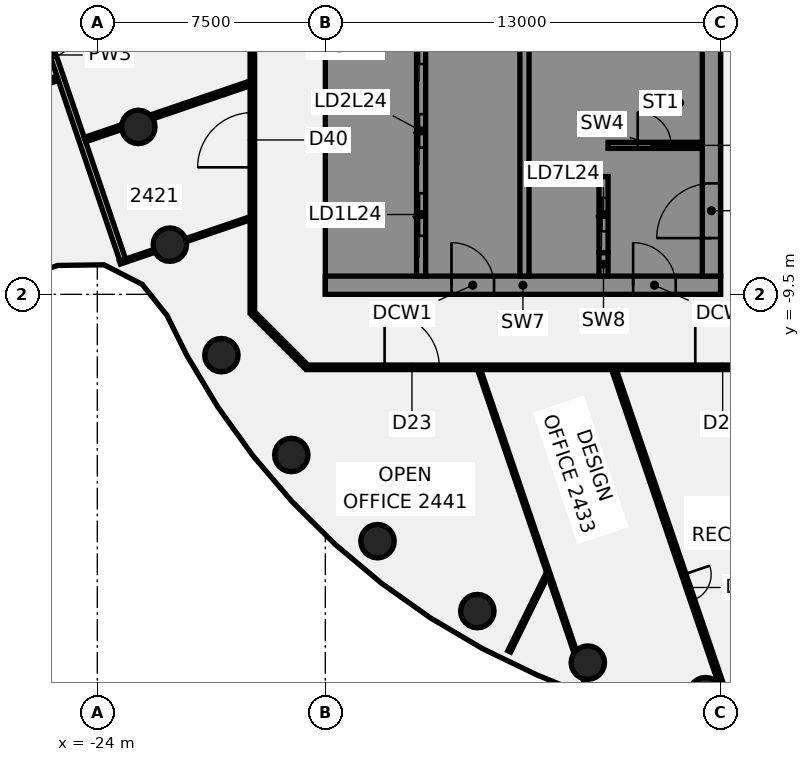
"""IFC4 building model, lengths in metres.
Left out: names, types, materials, properties, quantities, classifications, styles, units other than length and angle.
Written with IfcOpenShell. Run it as: python <this file> out.ifc"""

import sys

from ifc_helpers import new_model, si_unit, direction, frame, frame_2d, origin, origin_2d, place, context, subcontext, project, spatial, polyline, rectangle, circle, outline, extrude, element, fill, save


model = new_model("IFC4")
c1 = context("Model", 3, precision=1e-05, world=origin(), true_north=direction((0.0, 1.0)))
c2 = subcontext(c1, "Body", "Model", "MODEL_VIEW")
j1 = project(units=[si_unit("LENGTHUNIT", "METRE"), si_unit("PLANEANGLEUNIT", "RADIAN")], contexts=[c1])
p1 = place(None, origin())
s1 = spatial("IfcSite", under=j1, at=p1, CompositionType="ELEMENT")
p2 = place(p1, origin())
s2 = spatial("IfcBuilding", under=s1, at=p2, CompositionType="ELEMENT")
p3 = place(p2, frame((0.0, 0.0, 102.25)))
s3 = spatial("IfcBuildingStorey", under=s2, at=p3, CompositionType="ELEMENT", Elevation=102.25)
for number, where, z_axis, x_axis in (
    (1, (-22.651, -3.994, -0.14), (0.0, 0.0, 1.0), (1.0, 0.0, 0.0)),
    (2, (-21.613, -7.866, -0.14), (0.0, 0.0, 1.0), (1.0, 0.0, 0.0)),
    (3, (-19.919, -11.5, -0.14), (0.0, 0.0, 1.0), (1.0, 0.0, 0.0)),
    (4, (-17.619, -14.784, -0.14), (0.0, 0.0, 1.0), (1.0, 0.0, 0.0)),
    (5, (-14.784, -17.619, -0.14), (0.0, 0.0, 1.0), (1.0, 0.0, 0.0)),
    (6, (-11.5, -19.919, -0.14), (0.0, 0.0, 1.0), (1.0, 0.0, 0.0)),
    (7, (-7.866, -21.613, -0.14), (0.0, 0.0, 1.0), (1.0, 0.0, 0.0)),
    (8, (-3.994, -22.651, -0.14), (0.0, 0.0, 1.0), (1.0, 0.0, 0.0)),
):
    element("IfcColumn", number, at=place(p3, frame(where, z_axis=z_axis, x_axis=x_axis)), inside=s3, PredefinedType="COLUMN", context=c2, shape_type="SweptSolid", body=[
        extrude(circle(Radius=0.55, at=origin_2d()), origin(), (0.0, 0.0, 1.0), 3.75),
    ])
p4 = place(p3, frame((-27.757, 5.116, 0.0), z_axis=(0.0, 0.0, 1.0), x_axis=(0.32239970141, -0.946603630107, 0.0)))
e9 = element("IfcWall", 9, at=p4, inside=s3, PredefinedType="PARTITIONING", context=c2, shape_type="SweptSolid", body=[
    extrude(rectangle(XDim=14.249, YDim=0.2, at=frame_2d((7.124, 0.0))), origin(), (0.0, 0.0, 1.0), 3.01),
])
p5 = place(p4, frame((5.799, 0.0, 0.0)))
e10 = element("IfcOpeningElement", 10, at=p5, cuts=e9, PredefinedType="OPENING", context=c2, shape_type="SweptSolid", body=[
    extrude(rectangle(XDim=1.4, YDim=2.1, at=frame_2d((0.7, 1.05))), frame((0.0, 0.11, 0.0), z_axis=(0.0, -1.0, 0.0), x_axis=(1.0, 0.0, 0.0)), (0.0, 0.0, 1.0), 0.22),
])
p6 = place(p3, frame((-11.442, -11.976, 0.0), z_axis=(0.0, 0.0, 1.0), x_axis=(0.322410906035, -0.946599813897, 0.0)))
e11 = element("IfcWall", 11, at=p6, inside=s3, PredefinedType="PARTITIONING", context=c2, shape_type="SweptSolid", body=[
    extrude(rectangle(XDim=9.809, YDim=0.1, at=frame_2d((4.905, 0.0))), origin(), (0.0, 0.0, 1.0), 3.01),
])
p7 = place(p3, frame((-7.979, -22.143, 0.0), z_axis=(0.0, 0.0, 1.0), x_axis=(0.322833185495, -0.946455880822, 0.0)))
e12 = element("IfcWall", 12, at=p7, inside=s3, PredefinedType="PARTITIONING", context=c2, shape_type="SweptSolid", body=[
    extrude(rectangle(XDim=0.343, YDim=0.1, at=frame_2d((0.172, 0.0))), origin(), (0.0, 0.0, 1.0), 3.01),
])
p8 = place(p3, frame((-7.004, -11.98, 0.0), z_axis=(0.0, 0.0, 1.0), x_axis=(0.322345808009, -0.946621983718, 0.0)))
e13 = element("IfcWall", 13, at=p8, inside=s3, PredefinedType="PARTITIONING", context=c2, shape_type="SweptSolid", body=[
    extrude(rectangle(XDim=11.863, YDim=0.15, at=frame_2d((5.932, 0.0))), origin(), (0.0, 0.0, 1.0), 3.01),
])
p9 = place(p8, frame((7.115, 0.0, 0.0)))
e14 = element("IfcOpeningElement", 14, at=p9, cuts=e13, PredefinedType="OPENING", context=c2, shape_type="SweptSolid", body=[
    extrude(rectangle(XDim=0.9, YDim=2.1, at=frame_2d((0.45, 1.05))), frame((0.0, 0.085, 0.0), z_axis=(0.0, -1.0, 0.0), x_axis=(1.0, 0.0, 0.0)), (0.0, 0.0, 1.0), 0.17),
])
p10 = place(p3, frame((-18.872, -10.128, 0.0), z_axis=(0.0, 0.0, 1.0), x_axis=(0.707106781187, -0.707106781187, 0.0)))
e15 = element("IfcWall", 15, at=p10, inside=s3, PredefinedType="PARTITIONING", context=c2, shape_type="SweptSolid", body=[
    extrude(rectangle(XDim=2.465, YDim=0.15, at=frame_2d((1.232, 0.0))), origin(), (0.0, 0.0, 1.0), 3.01),
])
p11 = place(p3, frame((-17.1, -11.9, 0.0), z_axis=(0.0, 0.0, 1.0), x_axis=(1.0, 0.0, 0.0)))
e16 = element("IfcWall", 16, at=p11, inside=s3, PredefinedType="PARTITIONING", context=c2, shape_type="SweptSolid", body=[
    extrude(rectangle(XDim=34.165, YDim=0.15, at=frame_2d((17.083, 0.0))), origin(), (0.0, 0.0, 1.0), 3.01),
])
p12 = place(p11, frame((12.769, 0.0, 0.0)))
e17 = element("IfcOpeningElement", 17, at=p12, cuts=e16, PredefinedType="OPENING", context=c2, shape_type="SweptSolid", body=[
    extrude(rectangle(XDim=1.8, YDim=2.1, at=frame_2d((0.9, 1.05))), frame((0.0, 0.085, 0.0), z_axis=(0.0, -1.0, 0.0), x_axis=(1.0, 0.0, 0.0)), (0.0, 0.0, 1.0), 0.17),
])
p13 = place(p11, frame((2.55, 0.0, 0.0)))
e18 = element("IfcOpeningElement", 18, at=p13, cuts=e16, PredefinedType="OPENING", context=c2, shape_type="SweptSolid", body=[
    extrude(rectangle(XDim=1.8, YDim=2.1, at=frame_2d((0.9, 1.05))), frame((0.0, 0.085, 0.0), z_axis=(0.0, -1.0, 0.0), x_axis=(1.0, 0.0, 0.0)), (0.0, 0.0, 1.0), 0.17),
])
p14 = place(p11, frame((26.939, 0.0, 0.0)))
e19 = element("IfcOpeningElement", 19, at=p14, cuts=e16, PredefinedType="OPENING", context=c2, shape_type="SweptSolid", body=[
    extrude(rectangle(XDim=1.8, YDim=2.1, at=frame_2d((0.9, 1.05))), frame((0.0, 0.085, 0.0), z_axis=(0.0, -1.0, 0.0), x_axis=(1.0, 0.0, 0.0)), (0.0, 0.0, 1.0), 0.17),
])
p15 = place(p3, frame((-37.914, -6.687, 0.0), z_axis=(0.0, 0.0, 1.0), x_axis=(0.946617293071, 0.322359582545, 0.0)))
e20 = element("IfcWall", 20, at=p15, inside=s3, PredefinedType="PARTITIONING", context=c2, shape_type="SweptSolid", body=[
    extrude(rectangle(XDim=13.316, YDim=0.15, at=frame_2d((6.658, 0.0))), origin(), (0.0, 0.0, 1.0), 3.01),
])
p16 = place(p15, frame((4.42, 0.0, 0.0)))
e21 = element("IfcOpeningElement", 21, at=p16, cuts=e20, PredefinedType="OPENING", context=c2, shape_type="SweptSolid", body=[
    extrude(rectangle(XDim=0.9, YDim=2.1, at=frame_2d((0.45, 1.05))), frame((0.0, 0.085, 0.0), z_axis=(0.0, -1.0, 0.0), x_axis=(1.0, 0.0, 0.0)), (0.0, 0.0, 1.0), 0.17),
])
p17 = place(p3, frame((-24.406, -4.411, 0.0), z_axis=(0.0, 0.0, 1.0), x_axis=(0.94655971864, 0.322528601909, 0.0)))
e22 = element("IfcWall", 22, at=p17, inside=s3, PredefinedType="PARTITIONING", context=c2, shape_type="SweptSolid", body=[
    extrude(rectangle(XDim=1.266, YDim=0.15, at=frame_2d((0.633, 0.0))), origin(), (0.0, 0.0, 1.0), 3.01),
])
p18 = place(p3, frame((-22.215, -3.665, 0.0), z_axis=(0.0, 0.0, 1.0), x_axis=(0.946648978423, 0.322266522697, 0.0)))
e23 = element("IfcWall", 23, at=p18, inside=s3, PredefinedType="PARTITIONING", context=c2, shape_type="SweptSolid", body=[
    extrude(rectangle(XDim=3.417, YDim=0.15, at=frame_2d((1.708, 0.0))), origin(), (0.0, 0.0, 1.0), 3.01),
])
p19 = place(p3, frame((-23.257, -8.457, 0.0), z_axis=(0.0, 0.0, 1.0), x_axis=(0.946634095783, 0.322310236729, 0.0)))
e24 = element("IfcWall", 24, at=p19, inside=s3, PredefinedType="PARTITIONING", context=c2, shape_type="SweptSolid", body=[
    extrude(rectangle(XDim=1.203, YDim=0.1, at=frame_2d((0.602, 0.0))), origin(), (0.0, 0.0, 1.0), 3.01),
])
p20 = place(p3, frame((-21.092, -7.719, 0.0), z_axis=(0.0, 0.0, 1.0), x_axis=(0.946632895809, 0.322313761065, 0.0)))
e25 = element("IfcWall", 25, at=p20, inside=s3, PredefinedType="PARTITIONING", context=c2, shape_type="SweptSolid", body=[
    extrude(rectangle(XDim=2.236, YDim=0.1, at=frame_2d((1.118, 0.0))), origin(), (0.0, 0.0, 1.0), 3.01),
])
p21 = place(p3, frame((-10.45, -21.244, 0.0), z_axis=(0.0, 0.0, 1.0), x_axis=(0.441584599152, 0.897219617369, 0.0)))
e26 = element("IfcWall", 26, at=p21, inside=s3, PredefinedType="PARTITIONING", context=c2, shape_type="SweptSolid", body=[
    extrude(rectangle(XDim=2.798, YDim=0.1, at=frame_2d((1.399, 0.0))), origin(), (0.0, 0.0, 1.0), 3.01),
])
p22 = place(p3, frame((-18.9, -10.1, 0.0), z_axis=(0.0, 0.0, 1.0), x_axis=(0.0, 1.0, 0.0)))
e27 = element("IfcWall", 27, at=p22, inside=s3, PredefinedType="PARTITIONING", context=c2, shape_type="SweptSolid", body=[
    extrude(rectangle(XDim=20.2, YDim=0.15, at=frame_2d((10.1, 0.0))), origin(), (0.0, 0.0, 1.0), 3.01),
])
p23 = place(p22, frame((9.514, 0.0, 0.0)))
e28 = element("IfcOpeningElement", 28, at=p23, cuts=e27, PredefinedType="OPENING", context=c2, shape_type="SweptSolid", body=[
    extrude(rectangle(XDim=1.8, YDim=2.1, at=frame_2d((0.9, 1.05))), frame((0.0, 0.085, 0.0), z_axis=(0.0, -1.0, 0.0), x_axis=(1.0, 0.0, 0.0)), (0.0, 0.0, 1.0), 0.17),
])
p24 = place(p22, frame((4.777, 0.0, 0.0)))
e29 = element("IfcOpeningElement", 29, at=p24, cuts=e27, PredefinedType="OPENING", context=c2, shape_type="SweptSolid", body=[
    extrude(rectangle(XDim=1.8, YDim=2.1, at=frame_2d((0.9, 1.05))), frame((0.0, 0.085, 0.0), z_axis=(0.0, -1.0, 0.0), x_axis=(1.0, 0.0, 0.0)), (0.0, 0.0, 1.0), 0.17),
])
p25 = place(p3, frame((-16.5, -9.2, 0.0), z_axis=(0.0, 0.0, 1.0), x_axis=(1.0, 0.0, 0.0)))
e30 = element("IfcWall", 30, at=p25, inside=s3, PredefinedType="SHEAR", context=c2, shape_type="SweptSolid", body=[
    extrude(rectangle(XDim=13.0, YDim=0.6, at=frame_2d((6.5, 0.0))), origin(), (0.0, 0.0, 1.0), 3.61),
])
p26 = place(p25, frame((4.15, 0.0, 0.0)))
e31 = element("IfcOpeningElement", 31, at=p26, cuts=e30, PredefinedType="OPENING", context=c2, shape_type="SweptSolid", body=[
    extrude(rectangle(XDim=1.4, YDim=2.1, at=frame_2d((0.7, 1.05))), frame((0.0, 0.31, 0.0), z_axis=(0.0, -1.0, 0.0), x_axis=(1.0, 0.0, 0.0)), (0.0, 0.0, 1.0), 0.62),
])
p27 = place(p25, frame((10.125, 0.0, 0.0)))
e32 = element("IfcOpeningElement", 32, at=p27, cuts=e30, PredefinedType="OPENING", context=c2, shape_type="SweptSolid", body=[
    extrude(rectangle(XDim=1.4, YDim=2.1, at=frame_2d((0.7, 1.05))), frame((0.0, 0.31, 0.0), z_axis=(0.0, -1.0, 0.0), x_axis=(1.0, 0.0, 0.0)), (0.0, 0.0, 1.0), 0.62),
])
p28 = place(p3, origin())
e33 = element("IfcWall", 33, at=p28, inside=s3, PredefinedType="SHEAR", context=c2, shape_type="SweptSolid", body=[
    extrude(outline(polyline([(-13.5, -8.9), (-13.5, -8.125), (-15.9, -8.125), (-15.9, -5.625), (-13.5, -5.625), (-13.5, -5.375), (-15.9, -5.375), (-15.9, -2.875), (-13.5, -2.875), (-13.5, -2.625), (-15.9, -2.625), (-15.9, -0.125), (-13.5, -0.125), (-13.5, 0.125), (-15.9, 0.125), (-15.9, 2.625), (-13.5, 2.625), (-13.5, 2.875), (-15.9, 2.875), (-15.9, 5.375), (-13.5, 5.375), (-13.5, 5.625), (-15.9, 5.625), (-15.9, 8.125), (-13.5, 8.125), (-13.5, 8.9), (-15.9, 8.9), (-16.5, 8.9), (-16.5, -8.9), (-15.9, -8.9), (-13.5, -8.9)])), origin(), (0.0, 0.0, 1.0), 3.61),
])
p29 = place(p3, origin())
e34 = element("IfcWall", 34, at=p29, inside=s3, PredefinedType="SHEAR", context=c2, shape_type="SweptSolid", body=[
    extrude(outline(polyline([(-9.8, -5.375), (-9.8, -5.625), (-7.5, -5.625), (-7.2, -5.625), (-7.2, 8.9), (-7.5, 8.9), (-9.8, 8.9), (-9.8, 8.125), (-7.5, 8.125), (-7.5, 5.625), (-9.8, 5.625), (-9.8, 5.375), (-7.5, 5.375), (-7.5, 2.875), (-9.8, 2.875), (-9.8, 2.625), (-7.5, 2.625), (-7.5, 0.125), (-9.8, 0.125), (-9.8, -0.125), (-7.5, -0.125), (-7.5, -2.625), (-9.8, -2.625), (-9.8, -2.875), (-7.5, -2.875), (-7.5, -5.375), (-9.8, -5.375)])), origin(), (0.0, 0.0, 1.0), 3.61),
])
p30 = place(p3, origin())
e35 = element("IfcWall", 35, at=p30, inside=s3, PredefinedType="SHEAR", context=c2, shape_type="SweptSolid", body=[
    extrude(outline(polyline([(-7.5, -8.125), (-9.55, -8.125), (-9.55, -5.625), (-9.8, -5.625), (-9.8, -8.125), (-9.8, -8.9), (-7.5, -8.9), (-7.5, -8.125)])), origin(), (0.0, 0.0, 1.0), 3.61),
])
p31 = place(p3, frame((-7.35, -8.9, 0.0), z_axis=(0.0, 0.0, 1.0), x_axis=(0.0, 1.0, 0.0)))
e36 = element("IfcWall", 36, at=p31, inside=s3, PredefinedType="SHEAR", context=c2, shape_type="SweptSolid", body=[
    extrude(rectangle(XDim=0.775, YDim=0.3, at=frame_2d((0.387, 0.0))), origin(), (0.0, 0.0, 1.0), 3.61),
])
p32 = place(p3, frame((-13.35, -8.9, 0.0), z_axis=(0.0, 0.0, 1.0), x_axis=(0.0, 1.0, 0.0)))
e37 = element("IfcWall", 37, at=p32, inside=s3, PredefinedType="SHEAR", context=c2, shape_type="SweptSolid", body=[
    extrude(rectangle(XDim=17.8, YDim=0.3, at=frame_2d((8.9, 0.0))), origin(), (0.0, 0.0, 1.0), 3.61),
])
p33 = place(p32, frame((1.325, 0.0, 0.0)))
e38 = element("IfcOpeningElement", 38, at=p33, cuts=e37, PredefinedType="OPENING", context=c2, shape_type="SweptSolid", body=[
    extrude(rectangle(XDim=1.4, YDim=2.1, at=frame_2d((0.7, 1.05))), frame((0.0, 0.16, 0.0), z_axis=(0.0, -1.0, 0.0), x_axis=(1.0, 0.0, 0.0)), (0.0, 0.0, 1.0), 0.32),
])
p34 = place(p32, frame((4.225, 0.0, 0.0)))
e39 = element("IfcOpeningElement", 39, at=p34, cuts=e37, PredefinedType="OPENING", context=c2, shape_type="SweptSolid", body=[
    extrude(rectangle(XDim=1.1, YDim=2.1, at=frame_2d((0.55, 1.05))), frame((0.0, 0.16, 0.0), z_axis=(0.0, -1.0, 0.0), x_axis=(1.0, 0.0, 0.0)), (0.0, 0.0, 1.0), 0.32),
])
p35 = place(p32, frame((6.975, 0.0, 0.0)))
e40 = element("IfcOpeningElement", 40, at=p35, cuts=e37, PredefinedType="OPENING", context=c2, shape_type="SweptSolid", body=[
    extrude(rectangle(XDim=1.1, YDim=2.1, at=frame_2d((0.55, 1.05))), frame((0.0, 0.16, 0.0), z_axis=(0.0, -1.0, 0.0), x_axis=(1.0, 0.0, 0.0)), (0.0, 0.0, 1.0), 0.32),
])
p36 = place(p32, frame((9.725, 0.0, 0.0)))
e41 = element("IfcOpeningElement", 41, at=p36, cuts=e37, PredefinedType="OPENING", context=c2, shape_type="SweptSolid", body=[
    extrude(rectangle(XDim=1.1, YDim=2.1, at=frame_2d((0.55, 1.05))), frame((0.0, 0.16, 0.0), z_axis=(0.0, -1.0, 0.0), x_axis=(1.0, 0.0, 0.0)), (0.0, 0.0, 1.0), 0.32),
])
p37 = place(p32, frame((12.475, 0.0, 0.0)))
e42 = element("IfcOpeningElement", 42, at=p37, cuts=e37, PredefinedType="OPENING", context=c2, shape_type="SweptSolid", body=[
    extrude(rectangle(XDim=1.1, YDim=2.1, at=frame_2d((0.55, 1.05))), frame((0.0, 0.16, 0.0), z_axis=(0.0, -1.0, 0.0), x_axis=(1.0, 0.0, 0.0)), (0.0, 0.0, 1.0), 0.32),
])
p38 = place(p3, frame((-9.95, -8.9, 0.0), z_axis=(0.0, 0.0, 1.0), x_axis=(0.0, 1.0, 0.0)))
e43 = element("IfcWall", 43, at=p38, inside=s3, PredefinedType="SHEAR", context=c2, shape_type="SweptSolid", body=[
    extrude(rectangle(XDim=17.8, YDim=0.3, at=frame_2d((8.9, 0.0))), origin(), (0.0, 0.0, 1.0), 3.61),
])
p39 = place(p3, frame((-7.35, -8.125, 0.0), z_axis=(0.0, 0.0, 1.0), x_axis=(0.0, 1.0, 0.0)))
e44 = element("IfcWall", 44, at=p39, inside=s3, PredefinedType="SHEAR", context=c2, shape_type="SweptSolid", body=[
    extrude(rectangle(XDim=2.5, YDim=0.3, at=frame_2d((1.25, 0.0))), origin(), (0.0, 0.0, 1.0), 3.61),
])
p40 = place(p39, frame((0.7, 0.0, 0.0)))
e45 = element("IfcOpeningElement", 45, at=p40, cuts=e44, PredefinedType="OPENING", context=c2, shape_type="SweptSolid", body=[
    extrude(rectangle(XDim=1.1, YDim=2.1, at=frame_2d((0.55, 1.05))), frame((0.0, 0.16, 0.0), z_axis=(0.0, -1.0, 0.0), x_axis=(1.0, 0.0, 0.0)), (0.0, 0.0, 1.0), 0.32),
])
p41 = place(p3, frame((-3.8, -8.9, 0.0), z_axis=(0.0, 0.0, 1.0), x_axis=(0.0, 1.0, 0.0)))
e46 = element("IfcWall", 46, at=p41, inside=s3, PredefinedType="SHEAR", context=c2, shape_type="SweptSolid", body=[
    extrude(rectangle(XDim=17.8, YDim=0.6, at=frame_2d((8.9, 0.0))), origin(), (0.0, 0.0, 1.0), 3.61),
])
p42 = place(p41, frame((1.25, 0.0, 0.0)))
e47 = element("IfcOpeningElement", 47, at=p42, cuts=e46, PredefinedType="OPENING", context=c2, shape_type="SweptSolid", body=[
    extrude(rectangle(XDim=1.8, YDim=2.1, at=frame_2d((0.9, 1.05))), frame((0.0, 0.31, 0.0), z_axis=(0.0, -1.0, 0.0), x_axis=(1.0, 0.0, 0.0)), (0.0, 0.0, 1.0), 0.62),
])
p43 = place(p41, frame((13.8, 0.0, 0.0)))
e48 = element("IfcOpeningElement", 48, at=p43, cuts=e46, PredefinedType="OPENING", context=c2, shape_type="SweptSolid", body=[
    extrude(rectangle(XDim=1.0, YDim=2.1, at=frame_2d((0.5, 1.05))), frame((0.0, 0.31, 0.0), z_axis=(0.0, -1.0, 0.0), x_axis=(1.0, 0.0, 0.0)), (0.0, 0.0, 1.0), 0.62),
])
p44 = place(p3, frame((-7.2, -4.6, 0.0), z_axis=(0.0, 0.0, 1.0), x_axis=(1.0, 0.0, 0.0)))
e49 = element("IfcWall", 49, at=p44, inside=s3, PredefinedType="SHEAR", context=c2, shape_type="SweptSolid", body=[
    extrude(rectangle(XDim=3.1, YDim=0.2, at=frame_2d((1.55, 0.0))), origin(), (0.0, 0.0, 1.0), 3.61),
])
p45 = place(p44, frame((0.975, 0.0, 0.0)))
e50 = element("IfcOpeningElement", 50, at=p45, cuts=e49, PredefinedType="OPENING", context=c2, shape_type="SweptSolid", body=[
    extrude(rectangle(XDim=1.1, YDim=2.1, at=frame_2d((0.55, 1.05))), frame((0.0, 0.11, 0.0), z_axis=(0.0, -1.0, 0.0), x_axis=(1.0, 0.0, 0.0)), (0.0, 0.0, 1.0), 0.22),
])
p46 = place(p5, origin())
e51 = element("IfcDoor", 51, at=p46, inside=s3, OperationType="DOUBLE_DOOR_SINGLE_SWING", PredefinedType="DOOR", context=c2, shape_type="SweptSolid", body=[
    extrude(rectangle(XDim=1.4, YDim=2.1, at=frame_2d((0.7, 1.05))), frame((0.0, 0.025, 0.0), z_axis=(0.0, -1.0, 0.0), x_axis=(1.0, 0.0, 0.0)), (0.0, 0.0, 1.0), 0.05),
])
fill(e10, e51)
p47 = place(p9, frame((0.9, 0.0, 0.0), z_axis=(0.0, 0.0, 1.0), x_axis=(-1.0, 0.0, 0.0)))
e52 = element("IfcDoor", 52, at=p47, inside=s3, OperationType="SINGLE_SWING_RIGHT", PredefinedType="DOOR", context=c2, shape_type="SweptSolid", body=[
    extrude(rectangle(XDim=0.9, YDim=2.1, at=frame_2d((0.45, 1.05))), frame((0.0, 0.025, 0.0), z_axis=(0.0, -1.0, 0.0), x_axis=(1.0, 0.0, 0.0)), (0.0, 0.0, 1.0), 0.05),
])
fill(e14, e52)
p48 = place(p12, origin())
e53 = element("IfcDoor", 53, at=p48, inside=s3, OperationType="DOUBLE_DOOR_SINGLE_SWING", PredefinedType="DOOR", context=c2, shape_type="SweptSolid", body=[
    extrude(rectangle(XDim=1.8, YDim=2.1, at=frame_2d((0.9, 1.05))), frame((0.0, 0.025, 0.0), z_axis=(0.0, -1.0, 0.0), x_axis=(1.0, 0.0, 0.0)), (0.0, 0.0, 1.0), 0.05),
])
fill(e17, e53)
p49 = place(p13, frame((1.8, 0.0, 0.0), z_axis=(0.0, 0.0, 1.0), x_axis=(-1.0, 0.0, 0.0)))
e54 = element("IfcDoor", 54, at=p49, inside=s3, OperationType="DOUBLE_DOOR_SINGLE_SWING", PredefinedType="DOOR", context=c2, shape_type="SweptSolid", body=[
    extrude(rectangle(XDim=1.8, YDim=2.1, at=frame_2d((0.9, 1.05))), frame((0.0, 0.025, 0.0), z_axis=(0.0, -1.0, 0.0), x_axis=(1.0, 0.0, 0.0)), (0.0, 0.0, 1.0), 0.05),
])
fill(e18, e54)
p50 = place(p24, origin())
e55 = element("IfcDoor", 55, at=p50, inside=s3, OperationType="DOUBLE_DOOR_SINGLE_SWING", PredefinedType="DOOR", context=c2, shape_type="SweptSolid", body=[
    extrude(rectangle(XDim=1.8, YDim=2.1, at=frame_2d((0.9, 1.05))), frame((0.0, 0.025, 0.0), z_axis=(0.0, -1.0, 0.0), x_axis=(1.0, 0.0, 0.0)), (0.0, 0.0, 1.0), 0.05),
])
fill(e29, e55)
p51 = place(p26, origin())
e56 = element("IfcDoor", 56, at=p51, inside=s3, OperationType="SINGLE_SWING_LEFT", PredefinedType="DOOR", context=c2, shape_type="SweptSolid", body=[
    extrude(rectangle(XDim=1.4, YDim=2.1, at=frame_2d((0.7, 1.05))), frame((0.0, 0.025, 0.0), z_axis=(0.0, -1.0, 0.0), x_axis=(1.0, 0.0, 0.0)), (0.0, 0.0, 1.0), 0.05),
])
fill(e31, e56)
p52 = place(p27, origin())
e57 = element("IfcDoor", 57, at=p52, inside=s3, OperationType="SINGLE_SWING_LEFT", PredefinedType="DOOR", context=c2, shape_type="SweptSolid", body=[
    extrude(rectangle(XDim=1.4, YDim=2.1, at=frame_2d((0.7, 1.05))), frame((0.0, 0.025, 0.0), z_axis=(0.0, -1.0, 0.0), x_axis=(1.0, 0.0, 0.0)), (0.0, 0.0, 1.0), 0.05),
])
fill(e32, e57)
p53 = place(p42, origin())
e58 = element("IfcDoor", 58, at=p53, inside=s3, OperationType="SINGLE_SWING_LEFT", PredefinedType="DOOR", context=c2, shape_type="SweptSolid", body=[
    extrude(rectangle(XDim=1.8, YDim=2.1, at=frame_2d((0.9, 1.05))), frame((0.0, 0.025, 0.0), z_axis=(0.0, -1.0, 0.0), x_axis=(1.0, 0.0, 0.0)), (0.0, 0.0, 1.0), 0.05),
])
fill(e47, e58)
p54 = place(p45, origin())
e59 = element("IfcDoor", 59, at=p54, inside=s3, OperationType="SINGLE_SWING_LEFT", PredefinedType="DOOR", context=c2, shape_type="SweptSolid", body=[
    extrude(rectangle(XDim=1.1, YDim=2.1, at=frame_2d((0.55, 1.05))), frame((0.0, 0.025, 0.0), z_axis=(0.0, -1.0, 0.0), x_axis=(1.0, 0.0, 0.0)), (0.0, 0.0, 1.0), 0.05),
])
fill(e50, e59)
p55 = place(p33, origin())
e60 = element("IfcDoor", 60, at=p55, inside=s3, OperationType="SLIDING_TO_LEFT", PredefinedType="DOOR", context=c2, shape_type="SweptSolid", body=[
    extrude(rectangle(XDim=1.4, YDim=2.1, at=frame_2d((0.7, 1.05))), frame((0.0, 0.025, 0.0), z_axis=(0.0, -1.0, 0.0), x_axis=(1.0, 0.0, 0.0)), (0.0, 0.0, 1.0), 0.05),
])
fill(e38, e60)
p56 = place(p34, origin())
e61 = element("IfcDoor", 61, at=p56, inside=s3, OperationType="SLIDING_TO_LEFT", PredefinedType="DOOR", context=c2, shape_type="SweptSolid", body=[
    extrude(rectangle(XDim=1.1, YDim=2.1, at=frame_2d((0.55, 1.05))), frame((0.0, 0.025, 0.0), z_axis=(0.0, -1.0, 0.0), x_axis=(1.0, 0.0, 0.0)), (0.0, 0.0, 1.0), 0.05),
])
fill(e39, e61)
p57 = place(p35, origin())
e62 = element("IfcDoor", 62, at=p57, inside=s3, OperationType="SLIDING_TO_LEFT", PredefinedType="DOOR", context=c2, shape_type="SweptSolid", body=[
    extrude(rectangle(XDim=1.1, YDim=2.1, at=frame_2d((0.55, 1.05))), frame((0.0, 0.025, 0.0), z_axis=(0.0, -1.0, 0.0), x_axis=(1.0, 0.0, 0.0)), (0.0, 0.0, 1.0), 0.05),
])
fill(e40, e62)
p58 = place(p40, origin())
e63 = element("IfcDoor", 63, at=p58, inside=s3, OperationType="SLIDING_TO_LEFT", PredefinedType="DOOR", context=c2, shape_type="SweptSolid", body=[
    extrude(rectangle(XDim=1.1, YDim=2.1, at=frame_2d((0.55, 1.05))), frame((0.0, 0.025, 0.0), z_axis=(0.0, -1.0, 0.0), x_axis=(1.0, 0.0, 0.0)), (0.0, 0.0, 1.0), 0.05),
])
fill(e45, e63)
save(model, sys.argv[1])
